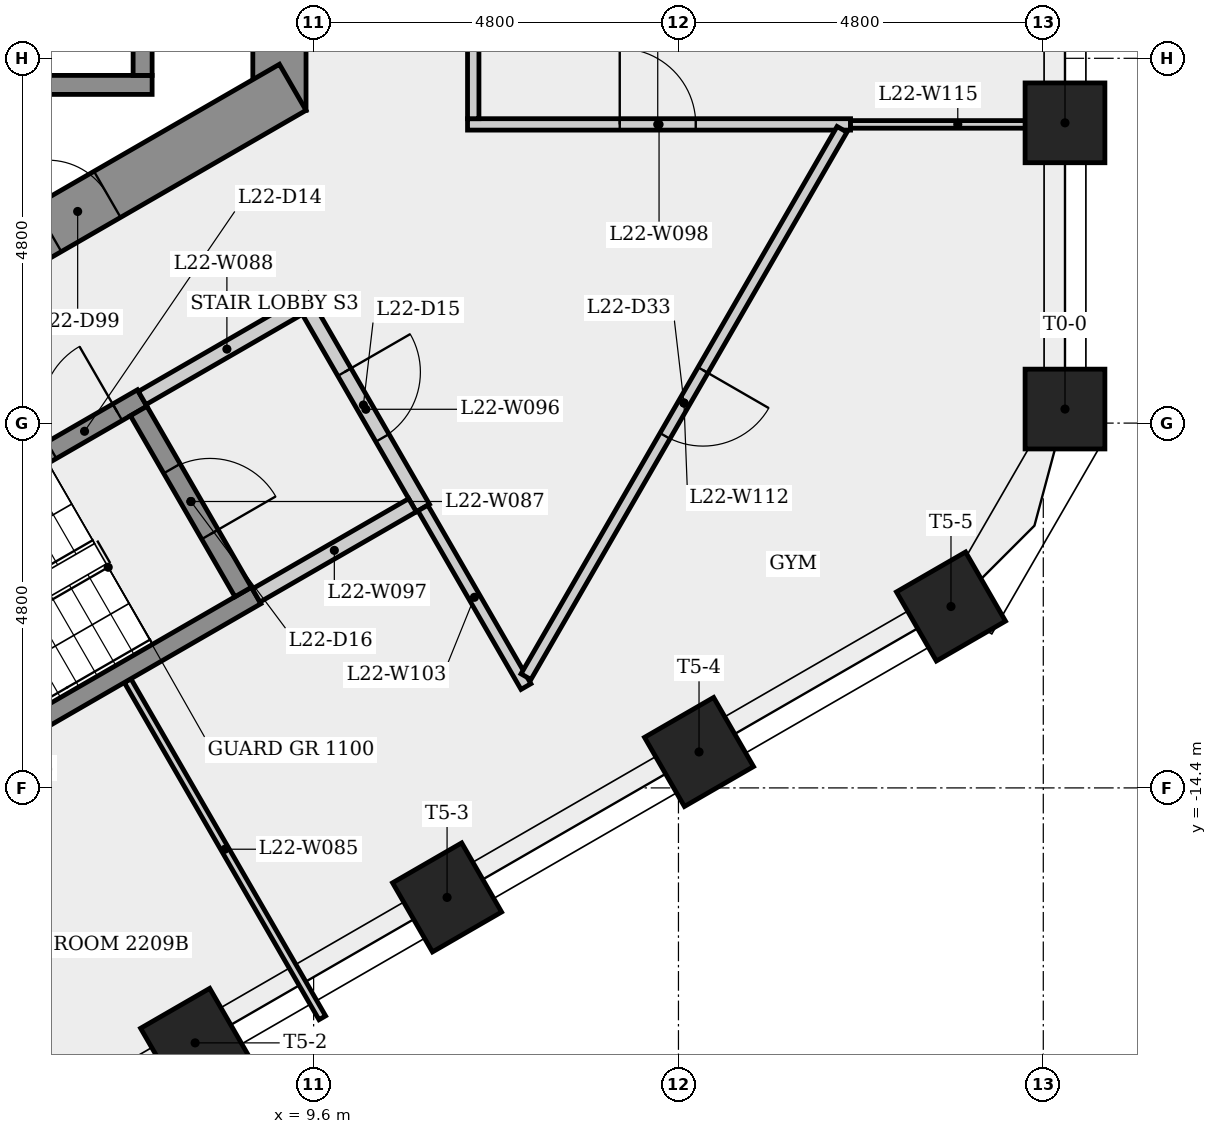
"""IFC4 building model, lengths in metres.
Left out: names, types, materials, properties, quantities, classifications, styles, units other than length and angle.
Written with IfcOpenShell. Run it as: python <this file> out.ifc"""

import sys

from ifc_helpers import new_model, si_unit, direction, frame, frame_2d, origin, origin_2d, place, context, subcontext, project, spatial, rectangle, extrude, element, fill, save


model = new_model("IFC4")
c1 = context("Model", 3, precision=1e-05, world=origin(), true_north=direction((0.0, 1.0)))
c2 = subcontext(c1, "Body", "Model", "MODEL_VIEW")
j1 = project(units=[si_unit("LENGTHUNIT", "METRE"), si_unit("PLANEANGLEUNIT", "RADIAN")], contexts=[c1])
p1 = place(None, origin())
s1 = spatial("IfcSite", under=j1, at=p1, CompositionType="ELEMENT")
p2 = place(p1, origin())
s2 = spatial("IfcBuilding", under=s1, at=p2, CompositionType="ELEMENT")
p3 = place(p2, frame((0.0, 0.0, 86.5)))
s3 = spatial("IfcBuildingStorey", under=s2, at=p3, CompositionType="ELEMENT", Elevation=86.5)
p4 = place(p3, frame((9.15, -5.485, 0.0), z_axis=(0.0, 0.0, 1.0), x_axis=(0.0, 1.0, 0.0)))
e1 = element("IfcWall", 1, at=p4, inside=s3, PredefinedType="SHEAR", context=c2, shape_type="SweptSolid", body=[
    extrude(rectangle(XDim=10.97, YDim=0.7, at=frame_2d((5.485, 0.0))), origin(), (0.0, 0.0, 1.0), 3.4),
])
p5 = place(p4, frame((4.685, 0.0, 0.0)))
e2 = element("IfcOpeningElement", 2, at=p5, cuts=e1, PredefinedType="OPENING", context=c2, shape_type="SweptSolid", body=[
    extrude(rectangle(XDim=1.6, YDim=2.1, at=frame_2d((0.8, 1.05))), frame((0.0, 0.36, 0.0), z_axis=(0.0, -1.0, 0.0), x_axis=(1.0, 0.0, 0.0)), (0.0, 0.0, 1.0), 0.72),
])
p6 = place(p3, frame((-0.175, -10.667, 0.0), z_axis=(0.0, 0.0, 1.0), x_axis=(0.866023993627, 0.500002442456, 0.0)))
e3 = element("IfcWall", 3, at=p6, inside=s3, PredefinedType="SHEAR", context=c2, shape_type="SweptSolid", body=[
    extrude(rectangle(XDim=10.97, YDim=0.7, at=frame_2d((5.485, 0.0))), origin(), (0.0, 0.0, 1.0), 3.4),
])
p7 = place(p6, frame((7.252, 0.0, 0.0)))
e4 = element("IfcOpeningElement", 4, at=p7, cuts=e3, PredefinedType="OPENING", context=c2, shape_type="SweptSolid", body=[
    extrude(rectangle(XDim=0.9, YDim=2.1, at=frame_2d((0.45, 1.05))), frame((0.0, 0.36, 0.0), z_axis=(0.0, -1.0, 0.0), x_axis=(1.0, 0.0, 0.0)), (0.0, 0.0, 1.0), 0.72),
])
for number, where, z_axis, x_axis in (
    (5, (19.486, -9.415, 0.0), (0.0, 0.0, 1.0), (1.0, 0.0, 0.0)),
    (6, (19.486, -5.649, 0.0), (0.0, 0.0, 1.0), (1.0, 0.0, 0.0)),
    (7, (8.041, -17.755, 0.0), (0.0, 0.0, 1.0), (0.5, -0.866, 0.0)),
    (8, (11.356, -15.841, 0.0), (0.0, 0.0, 1.0), (0.5, -0.866, 0.0)),
    (9, (14.671, -13.927, 0.0), (0.0, 0.0, 1.0), (0.5, -0.866, 0.0)),
    (10, (17.986, -12.013, 0.0), (0.0, 0.0, 1.0), (0.5, -0.866, 0.0)),
):
    element("IfcColumn", number, at=place(p3, frame(where, z_axis=z_axis, x_axis=x_axis)), inside=s3, PredefinedType="COLUMN", context=c2, shape_type="SweptSolid", body=[
        extrude(rectangle(XDim=1.05, YDim=1.05, at=origin_2d()), origin(), (0.0, 0.0, 1.0), 3.4),
    ])
p8 = place(p3, frame((-7.225, -5.15, 0.0), z_axis=(0.0, 0.0, 1.0), x_axis=(1.0, 0.0, 0.0)))
e11 = element("IfcWall", 11, at=p8, inside=s3, PredefinedType="SHEAR", context=c2, shape_type="SweptSolid", body=[
    extrude(rectangle(XDim=14.7, YDim=0.25, at=frame_2d((7.35, 0.0))), origin(), (0.0, 0.0, 1.0), 3.05),
])
p9 = place(p3, frame((1.585, -12.595, 0.0), z_axis=(0.0, 0.0, 1.0), x_axis=(0.866036417653, 0.499980922934, 0.0)))
e12 = element("IfcWall", 12, at=p9, inside=s3, PredefinedType="SHEAR", context=c2, shape_type="SweptSolid", body=[
    extrude(rectangle(XDim=6.65, YDim=0.25, at=frame_2d((3.325, 0.0))), origin(), (0.0, 0.0, 1.0), 3.05),
])
p10 = place(p9, frame((5.275, 0.0, 0.0)))
e13 = element("IfcOpeningElement", 13, at=p10, cuts=e12, PredefinedType="OPENING", context=c2, shape_type="SweptSolid", body=[
    extrude(rectangle(XDim=1.0, YDim=2.1, at=frame_2d((0.5, 1.05))), frame((0.0, 0.135, 0.0), z_axis=(0.0, -1.0, 0.0), x_axis=(1.0, 0.0, 0.0)), (0.0, 0.0, 1.0), 0.27),
])
p11 = place(p3, frame((7.153, -12.989, 0.0), z_axis=(0.0, 0.0, 1.0), x_axis=(0.50001950338, -0.86601414321, 0.0)))
e14 = element("IfcWall", 14, at=p11, inside=s3, PredefinedType="PARTITIONING", context=c2, shape_type="SweptSolid", body=[
    extrude(rectangle(XDim=5.122, YDim=0.1, at=frame_2d((2.561, 0.0))), origin(), (0.0, 0.0, 1.0), 3.05),
])
p12 = place(p3, frame((3.301, -15.068, 0.0), z_axis=(0.0, 0.0, 1.0), x_axis=(0.866035036182, 0.499983315828, 0.0)))
e15 = element("IfcWall", 15, at=p12, inside=s3, PredefinedType="SHEAR", context=c2, shape_type="SweptSolid", body=[
    extrude(rectangle(XDim=6.4, YDim=0.25, at=frame_2d((3.2, 0.0))), origin(), (0.0, 0.0, 1.0), 3.05),
])
p13 = place(p3, frame((7.298, -9.441, 0.0), z_axis=(0.0, 0.0, 1.0), x_axis=(0.500034990121, -0.866005201286, 0.0)))
e16 = element("IfcWall", 16, at=p13, inside=s3, PredefinedType="SHEAR", context=c2, shape_type="SweptSolid", body=[
    extrude(rectangle(XDim=2.75, YDim=0.25, at=frame_2d((1.375, 0.0))), origin(), (0.0, 0.0, 1.0), 3.05),
])
p14 = place(p13, frame((0.875, 0.0, 0.0)))
e17 = element("IfcOpeningElement", 17, at=p14, cuts=e16, PredefinedType="OPENING", context=c2, shape_type="SweptSolid", body=[
    extrude(rectangle(XDim=1.0, YDim=2.1, at=frame_2d((0.5, 1.05))), frame((0.0, 0.135, 0.0), z_axis=(0.0, -1.0, 0.0), x_axis=(1.0, 0.0, 0.0)), (0.0, 0.0, 1.0), 0.27),
])
p15 = place(p3, frame((7.344, -9.27, 0.0), z_axis=(0.0, 0.0, 1.0), x_axis=(0.866005588531, 0.500034319456, 0.0)))
e18 = element("IfcWall", 18, at=p15, inside=s3, PredefinedType="PARTITIONING", context=c2, shape_type="SweptSolid", body=[
    extrude(rectangle(XDim=2.575, YDim=0.2, at=frame_2d((1.288, 0.0))), origin(), (0.0, 0.0, 1.0), 3.05),
])
p16 = place(p3, frame((7.35, -1.925, 0.0), z_axis=(0.0, 0.0, 1.0), x_axis=(0.0, -1.0, 0.0)))
e19 = element("IfcWall", 19, at=p16, inside=s3, PredefinedType="SHEAR", context=c2, shape_type="SweptSolid", body=[
    extrude(rectangle(XDim=3.1, YDim=0.25, at=frame_2d((1.55, 0.0))), origin(), (0.0, 0.0, 1.0), 3.4),
])
p17 = place(p3, frame((9.537, -8.119, 0.0), z_axis=(0.0, 0.0, 1.0), x_axis=(0.499990139034, -0.866031096941, 0.0)))
e20 = element("IfcWall", 20, at=p17, inside=s3, PredefinedType="PARTITIONING", context=c2, shape_type="SweptSolid", body=[
    extrude(rectangle(XDim=3.0, YDim=0.2, at=frame_2d((1.5, 0.0))), origin(), (0.0, 0.0, 1.0), 3.05),
])
p18 = place(p17, frame((0.935, 0.0, 0.0)))
e21 = element("IfcOpeningElement", 21, at=p18, cuts=e20, PredefinedType="OPENING", context=c2, shape_type="SweptSolid", body=[
    extrude(rectangle(XDim=1.0, YDim=2.1, at=frame_2d((0.5, 1.05))), frame((0.0, 0.11, 0.0), z_axis=(0.0, -1.0, 0.0), x_axis=(1.0, 0.0, 0.0)), (0.0, 0.0, 1.0), 0.22),
])
p19 = place(p3, frame((10.901, -10.681, 0.0), z_axis=(0.0, 0.0, 1.0), x_axis=(-0.866007538022, -0.500030943131, 0.0)))
e22 = element("IfcWall", 22, at=p19, inside=s3, PredefinedType="PARTITIONING", context=c2, shape_type="SweptSolid", body=[
    extrude(rectangle(XDim=2.375, YDim=0.2, at=frame_2d((1.188, 0.0))), origin(), (0.0, 0.0, 1.0), 3.05),
])
p20 = place(p3, frame((11.625, -5.67, 0.0), z_axis=(0.0, 0.0, 1.0), x_axis=(1.0, 0.0, 0.0)))
e23 = element("IfcWall", 23, at=p20, inside=s3, PredefinedType="PARTITIONING", context=c2, shape_type="SweptSolid", body=[
    extrude(rectangle(XDim=5.039, YDim=0.15, at=frame_2d((2.52, 0.0))), origin(), (0.0, 0.0, 1.0), 3.05),
])
p21 = place(p20, frame((2.002, 0.0, 0.0)))
e24 = element("IfcOpeningElement", 24, at=p21, cuts=e23, PredefinedType="OPENING", context=c2, shape_type="SweptSolid", body=[
    extrude(rectangle(XDim=1.0, YDim=2.1, at=frame_2d((0.5, 1.05))), frame((0.0, 0.085, 0.0), z_axis=(0.0, -1.0, 0.0), x_axis=(1.0, 0.0, 0.0)), (0.0, 0.0, 1.0), 0.17),
])
p22 = place(p3, frame((11.7, -5.595, 0.0), z_axis=(0.0, 0.0, 1.0), x_axis=(0.0, 1.0, 0.0)))
e25 = element("IfcWall", 25, at=p22, inside=s3, PredefinedType="PARTITIONING", context=c2, shape_type="SweptSolid", body=[
    extrude(rectangle(XDim=10.789, YDim=0.15, at=frame_2d((5.395, 0.0))), origin(), (0.0, 0.0, 1.0), 3.05),
])
p23 = place(p22, frame((5.095, 0.0, 0.0)))
e26 = element("IfcOpeningElement", 26, at=p23, cuts=e25, PredefinedType="OPENING", context=c2, shape_type="SweptSolid", body=[
    extrude(rectangle(XDim=1.0, YDim=2.1, at=frame_2d((0.5, 1.05))), frame((0.0, 0.085, 0.0), z_axis=(0.0, -1.0, 0.0), x_axis=(1.0, 0.0, 0.0)), (0.0, 0.0, 1.0), 0.17),
])
p24 = place(p3, frame((12.394, -13.067, 0.0), z_axis=(0.0, 0.0, 1.0), x_axis=(-0.499971721724, 0.866041729639, 0.0)))
e27 = element("IfcWall", 27, at=p24, inside=s3, PredefinedType="PARTITIONING", context=c2, shape_type="SweptSolid", body=[
    extrude(rectangle(XDim=2.713, YDim=0.15, at=frame_2d((1.356, 0.0))), origin(), (0.0, 0.0, 1.0), 3.05),
])
p25 = place(p3, frame((16.552, -5.735, 0.0), z_axis=(0.0, 0.0, 1.0), x_axis=(-0.500003678222, -0.866023280152, 0.0)))
e28 = element("IfcWall", 28, at=p25, inside=s3, PredefinedType="PARTITIONING", context=c2, shape_type="SweptSolid", body=[
    extrude(rectangle(XDim=8.316, YDim=0.15, at=frame_2d((4.158, 0.0))), origin(), (0.0, 0.0, 1.0), 3.05),
])
p26 = place(p25, frame((3.658, 0.0, 0.0)))
e29 = element("IfcOpeningElement", 29, at=p26, cuts=e28, PredefinedType="OPENING", context=c2, shape_type="SweptSolid", body=[
    extrude(rectangle(XDim=1.0, YDim=2.1, at=frame_2d((0.5, 1.05))), frame((0.0, 0.085, 0.0), z_axis=(0.0, -1.0, 0.0), x_axis=(1.0, 0.0, 0.0)), (0.0, 0.0, 1.0), 0.17),
])
p27 = place(p3, frame((19.486, -5.67, 0.0), z_axis=(0.0, 0.0, 1.0), x_axis=(-1.0, 0.0, 0.0)))
e30 = element("IfcWall", 30, at=p27, inside=s3, PredefinedType="PARTITIONING", context=c2, shape_type="SweptSolid", body=[
    extrude(rectangle(XDim=2.821, YDim=0.1, at=frame_2d((1.411, 0.0))), origin(), (0.0, 0.0, 1.0), 3.05),
])
p28 = place(p10, origin())
e31 = element("IfcDoor", 31, at=p28, inside=s3, OperationType="SINGLE_SWING_RIGHT", PredefinedType="DOOR", context=c2, shape_type="SweptSolid", body=[
    extrude(rectangle(XDim=1.0, YDim=2.1, at=frame_2d((0.5, 1.05))), frame((0.0, 0.025, 0.0), z_axis=(0.0, -1.0, 0.0), x_axis=(1.0, 0.0, 0.0)), (0.0, 0.0, 1.0), 0.05),
])
fill(e13, e31)
p29 = place(p18, origin())
e32 = element("IfcDoor", 32, at=p29, inside=s3, OperationType="SINGLE_SWING_LEFT", PredefinedType="DOOR", context=c2, shape_type="SweptSolid", body=[
    extrude(rectangle(XDim=1.0, YDim=2.1, at=frame_2d((0.5, 1.05))), frame((0.0, 0.025, 0.0), z_axis=(0.0, -1.0, 0.0), x_axis=(1.0, 0.0, 0.0)), (0.0, 0.0, 1.0), 0.05),
])
fill(e21, e32)
p30 = place(p14, origin())
e33 = element("IfcDoor", 33, at=p30, inside=s3, OperationType="SINGLE_SWING_RIGHT", PredefinedType="DOOR", context=c2, shape_type="SweptSolid", body=[
    extrude(rectangle(XDim=1.0, YDim=2.1, at=frame_2d((0.5, 1.05))), frame((0.0, 0.025, 0.0), z_axis=(0.0, -1.0, 0.0), x_axis=(1.0, 0.0, 0.0)), (0.0, 0.0, 1.0), 0.05),
])
fill(e17, e33)
p31 = place(p21, origin())
e34 = element("IfcDoor", 34, at=p31, inside=s3, OperationType="SINGLE_SWING_LEFT", PredefinedType="DOOR", context=c2, shape_type="SweptSolid", body=[
    extrude(rectangle(XDim=1.0, YDim=2.1, at=frame_2d((0.5, 1.05))), frame((0.0, 0.025, 0.0), z_axis=(0.0, -1.0, 0.0), x_axis=(1.0, 0.0, 0.0)), (0.0, 0.0, 1.0), 0.05),
])
fill(e24, e34)
p32 = place(p26, origin())
e35 = element("IfcDoor", 35, at=p32, inside=s3, OperationType="SINGLE_SWING_LEFT", PredefinedType="DOOR", context=c2, shape_type="SweptSolid", body=[
    extrude(rectangle(XDim=1.0, YDim=2.1, at=frame_2d((0.5, 1.05))), frame((0.0, 0.025, 0.0), z_axis=(0.0, -1.0, 0.0), x_axis=(1.0, 0.0, 0.0)), (0.0, 0.0, 1.0), 0.05),
])
fill(e29, e35)
p33 = place(p7, origin())
e36 = element("IfcDoor", 36, at=p33, inside=s3, OperationType="SINGLE_SWING_LEFT", PredefinedType="DOOR", context=c2, shape_type="SweptSolid", body=[
    extrude(rectangle(XDim=0.9, YDim=2.1, at=frame_2d((0.45, 1.05))), frame((0.0, 0.025, 0.0), z_axis=(0.0, -1.0, 0.0), x_axis=(1.0, 0.0, 0.0)), (0.0, 0.0, 1.0), 0.05),
])
fill(e4, e36)
save(model, sys.argv[1])
